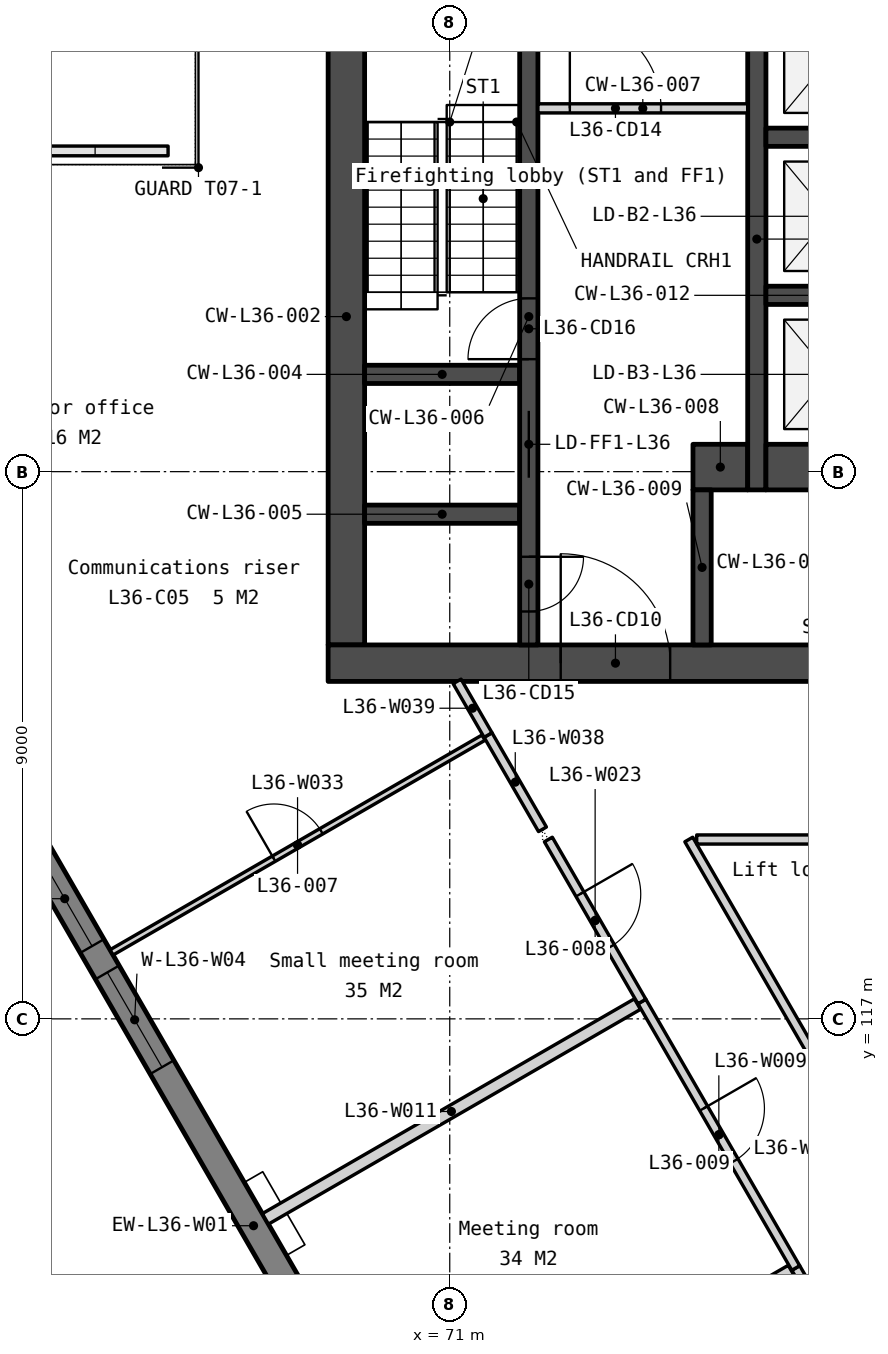
"""IFC4 building model, lengths in metres.
Left out: names, types, materials, properties, quantities, classifications, styles, units other than length and angle.
Written with IfcOpenShell. Run it as: python <this file> out.ifc"""

import sys

from ifc_helpers import new_model, si_unit, direction, frame, frame_2d, origin, place, context, subcontext, project, spatial, polyline, rectangle, outline, extrude, element, fill, save


model = new_model("IFC4")
c1 = context("Model", 3, precision=1e-05, world=origin(), true_north=direction((0.0, 1.0)))
c2 = subcontext(c1, "Body", "Model", "MODEL_VIEW")
j1 = project(units=[si_unit("LENGTHUNIT", "METRE"), si_unit("PLANEANGLEUNIT", "RADIAN")], contexts=[c1])
p1 = place(None, origin())
s1 = spatial("IfcSite", under=j1, at=p1, CompositionType="ELEMENT")
p2 = place(p1, origin())
s2 = spatial("IfcBuilding", under=s1, at=p2, CompositionType="ELEMENT")
p3 = place(p2, frame((0.0, 0.0, 144.2)))
s3 = spatial("IfcBuildingStorey", under=s2, at=p3, CompositionType="ELEMENT", Elevation=144.2)
p4 = place(p3, frame((69.3, 133.95, 0.0), z_axis=(0.0, 0.0, 1.0), x_axis=(0.0, -1.0, 0.0)))
e1 = element("IfcWall", 1, at=p4, inside=s3, PredefinedType="SOLIDWALL", context=c2, shape_type="SweptSolid", body=[
    extrude(rectangle(XDim=10.8, YDim=0.6, at=frame_2d((5.4, 0.0))), origin(), (0.0, 0.0, 1.0), 3.75),
])
p5 = place(p3, frame((69.0, 122.85, 0.0), z_axis=(0.0, 0.0, 1.0), x_axis=(1.0, 0.0, 0.0)))
e2 = element("IfcWall", 2, at=p5, inside=s3, PredefinedType="SOLIDWALL", context=c2, shape_type="SweptSolid", body=[
    extrude(rectangle(XDim=22.0, YDim=0.6, at=frame_2d((11.0, 0.0))), origin(), (0.0, 0.0, 1.0), 3.75),
])
p6 = place(p5, frame((16.375, 0.0, 0.0)))
e3 = element("IfcOpeningElement", 3, at=p6, cuts=e2, PredefinedType="OPENING", context=c2, shape_type="SweptSolid", body=[
    extrude(rectangle(XDim=1.8, YDim=2.1, at=frame_2d((0.9, 1.05))), frame((0.0, 0.31, 0.0), z_axis=(0.0, -1.0, 0.0), x_axis=(1.0, 0.0, 0.0)), (0.0, 0.0, 1.0), 0.62),
])
p7 = place(p5, frame((3.825, 0.0, 0.0)))
e4 = element("IfcOpeningElement", 4, at=p7, cuts=e2, PredefinedType="OPENING", context=c2, shape_type="SweptSolid", body=[
    extrude(rectangle(XDim=1.8, YDim=2.1, at=frame_2d((0.9, 1.05))), frame((0.0, 0.31, 0.0), z_axis=(0.0, -1.0, 0.0), x_axis=(1.0, 0.0, 0.0)), (0.0, 0.0, 1.0), 0.62),
])
p8 = place(p5, frame((12.85, 0.0, 0.0)))
e5 = element("IfcOpeningElement", 5, at=p8, cuts=e2, PredefinedType="OPENING", context=c2, shape_type="SweptSolid", body=[
    extrude(rectangle(XDim=1.5, YDim=2.1, at=frame_2d((0.75, 1.05))), frame((0.0, 0.31, 0.0), z_axis=(0.0, -1.0, 0.0), x_axis=(1.0, 0.0, 0.0)), (0.0, 0.0, 1.0), 0.62),
])
for number, where, z_axis, x_axis in (
    (6, (69.6, 127.6, 0.0), (0.0, 0.0, 1.0), (1.0, 0.0, 0.0)),
    (7, (69.6, 125.3, 0.0), (0.0, 0.0, 1.0), (1.0, 0.0, 0.0)),
):
    element("IfcWall", number, at=place(p3, frame(where, z_axis=z_axis, x_axis=x_axis)), inside=s3, PredefinedType="SOLIDWALL", context=c2, shape_type="SweptSolid", body=[
        extrude(rectangle(XDim=2.55, YDim=0.3, at=frame_2d((1.275, 0.0))), origin(), (0.0, 0.0, 1.0), 3.75),
    ])
p9 = place(p3, frame((72.3, 133.95, 0.0), z_axis=(0.0, 0.0, 1.0), x_axis=(0.0, -1.0, 0.0)))
e8 = element("IfcWall", 8, at=p9, inside=s3, PredefinedType="SOLIDWALL", context=c2, shape_type="SweptSolid", body=[
    extrude(rectangle(XDim=10.8, YDim=0.3, at=frame_2d((5.4, 0.0))), origin(), (0.0, 0.0, 1.0), 3.75),
])
p10 = place(p9, frame((6.95, 0.0, 0.0)))
e9 = element("IfcOpeningElement", 9, at=p10, cuts=e8, PredefinedType="OPENING", context=c2, shape_type="SweptSolid", body=[
    extrude(rectangle(XDim=1.1, YDim=2.1, at=frame_2d((0.55, 1.05))), frame((0.0, 0.16, 0.0), z_axis=(0.0, -1.0, 0.0), x_axis=(1.0, 0.0, 0.0)), (0.0, 0.0, 1.0), 0.32),
])
p11 = place(p9, frame((9.35, 0.0, 0.0)))
e10 = element("IfcOpeningElement", 10, at=p11, cuts=e8, PredefinedType="OPENING", context=c2, shape_type="SweptSolid", body=[
    extrude(rectangle(XDim=0.9, YDim=2.1, at=frame_2d((0.45, 1.05))), frame((0.0, 0.16, 0.0), z_axis=(0.0, -1.0, 0.0), x_axis=(1.0, 0.0, 0.0)), (0.0, 0.0, 1.0), 0.32),
])
p12 = place(p9, frame((5.1, 0.0, 0.0)))
e11 = element("IfcOpeningElement", 11, at=p12, cuts=e8, PredefinedType="OPENING", context=c2, shape_type="SweptSolid", body=[
    extrude(rectangle(XDim=1.0, YDim=2.1, at=frame_2d((0.5, 1.05))), frame((0.0, 0.16, 0.0), z_axis=(0.0, -1.0, 0.0), x_axis=(1.0, 0.0, 0.0)), (0.0, 0.0, 1.0), 0.32),
])
p13 = place(p3, frame((72.45, 131.975, 0.0), z_axis=(0.0, 0.0, 1.0), x_axis=(1.0, 0.0, 0.0)))
e12 = element("IfcWall", 12, at=p13, inside=s3, PredefinedType="PARTITIONING", context=c2, shape_type="SweptSolid", body=[
    extrude(rectangle(XDim=3.45, YDim=0.15, at=frame_2d((1.725, 0.0))), origin(), (0.0, 0.0, 1.0), 3.75),
])
p14 = place(p13, frame((0.525, 0.0, 0.0)))
e13 = element("IfcOpeningElement", 13, at=p14, cuts=e12, PredefinedType="OPENING", context=c2, shape_type="SweptSolid", body=[
    extrude(rectangle(XDim=1.5, YDim=2.1, at=frame_2d((0.75, 1.05))), frame((0.0, 0.085, 0.0), z_axis=(0.0, -1.0, 0.0), x_axis=(1.0, 0.0, 0.0)), (0.0, 0.0, 1.0), 0.17),
])
p15 = place(p3, frame((75.0, 126.075, 0.0), z_axis=(0.0, 0.0, 1.0), x_axis=(1.0, 0.0, 0.0)))
e14 = element("IfcWall", 14, at=p15, inside=s3, PredefinedType="SOLIDWALL", context=c2, shape_type="SweptSolid", body=[
    extrude(rectangle(XDim=0.9, YDim=0.75, at=frame_2d((0.45, 0.0))), origin(), (0.0, 0.0, 1.0), 3.75),
])
p16 = place(p3, frame((75.15, 125.7, 0.0), z_axis=(0.0, 0.0, 1.0), x_axis=(0.0, -1.0, 0.0)))
e15 = element("IfcWall", 15, at=p16, inside=s3, PredefinedType="SOLIDWALL", context=c2, shape_type="SweptSolid", body=[
    extrude(rectangle(XDim=2.55, YDim=0.3, at=frame_2d((1.275, 0.0))), origin(), (0.0, 0.0, 1.0), 3.75),
])
p17 = place(p3, frame((76.05, 133.95, 0.0), z_axis=(0.0, 0.0, 1.0), x_axis=(0.0, -1.0, 0.0)))
e16 = element("IfcWall", 16, at=p17, inside=s3, PredefinedType="SOLIDWALL", context=c2, shape_type="SweptSolid", body=[
    extrude(rectangle(XDim=8.25, YDim=0.3, at=frame_2d((4.125, 0.0))), origin(), (0.0, 0.0, 1.0), 3.75),
])
for number, where, z_axis, x_axis in (
    (17, (76.2, 131.5, 0.0), (0.0, 0.0, 1.0), (1.0, 0.0, 0.0)),
    (18, (76.2, 128.9, 0.0), (0.0, 0.0, 1.0), (1.0, 0.0, 0.0)),
):
    element("IfcWall", number, at=place(p3, frame(where, z_axis=z_axis, x_axis=x_axis)), inside=s3, PredefinedType="SOLIDWALL", context=c2, shape_type="SweptSolid", body=[
        extrude(rectangle(XDim=2.1, YDim=0.3, at=frame_2d((1.05, 0.0))), origin(), (0.0, 0.0, 1.0), 3.75),
    ])
p18 = place(p3, frame((76.2, 126.075, 0.0), z_axis=(0.0, 0.0, 1.0), x_axis=(1.0, 0.0, 0.0)))
e19 = element("IfcWall", 19, at=p18, inside=s3, PredefinedType="SOLIDWALL", context=c2, shape_type="SweptSolid", body=[
    extrude(rectangle(XDim=2.1, YDim=0.75, at=frame_2d((1.05, 0.0))), origin(), (0.0, 0.0, 1.0), 3.75),
])
p19 = place(p3, frame((57.652, 131.129, -0.15), z_axis=(0.0, 0.0, 1.0), x_axis=(0.499997369791, -0.866026922331, 0.0)))
e20 = element("IfcWall", 20, at=p19, inside=s3, PredefinedType="SOLIDWALL", context=c2, shape_type="SweptSolid", body=[
    extrude(outline(polyline([(40.486, 0.0), (40.486, 3.9), (0.0, 3.9), (0.0, 0.0), (40.486, 0.0)])), frame((0.0, 0.225, 0.0), z_axis=(0.0, -1.0, 0.0), x_axis=(1.0, 0.0, 0.0)), (0.0, 0.0, 1.0), 0.45),
])
p20 = place(p19, frame((3.011, 0.0, 0.95)))
e21 = element("IfcOpeningElement", 21, at=p20, cuts=e20, PredefinedType="OPENING", context=c2, shape_type="SweptSolid", body=[
    extrude(rectangle(XDim=1.8, YDim=2.2, at=frame_2d((0.9, 1.1))), frame((0.0, 0.235, 0.0), z_axis=(0.0, -1.0, 0.0), x_axis=(1.0, 0.0, 0.0)), (0.0, 0.0, 1.0), 0.47),
])
p21 = place(p19, frame((5.311, 0.0, 0.95)))
e22 = element("IfcOpeningElement", 22, at=p21, cuts=e20, PredefinedType="OPENING", context=c2, shape_type="SweptSolid", body=[
    extrude(rectangle(XDim=1.8, YDim=2.2, at=frame_2d((0.9, 1.1))), frame((0.0, 0.235, 0.0), z_axis=(0.0, -1.0, 0.0), x_axis=(1.0, 0.0, 0.0)), (0.0, 0.0, 1.0), 0.47),
])
p22 = place(p19, frame((13.132, 0.0, 0.95)))
e23 = element("IfcOpeningElement", 23, at=p22, cuts=e20, PredefinedType="OPENING", context=c2, shape_type="SweptSolid", body=[
    extrude(rectangle(XDim=1.8, YDim=2.2, at=frame_2d((0.9, 1.1))), frame((0.0, 0.235, 0.0), z_axis=(0.0, -1.0, 0.0), x_axis=(1.0, 0.0, 0.0)), (0.0, 0.0, 1.0), 0.47),
])
p23 = place(p19, frame((15.432, 0.0, 0.95)))
e24 = element("IfcOpeningElement", 24, at=p23, cuts=e20, PredefinedType="OPENING", context=c2, shape_type="SweptSolid", body=[
    extrude(rectangle(XDim=1.8, YDim=2.2, at=frame_2d((0.9, 1.1))), frame((0.0, 0.235, 0.0), z_axis=(0.0, -1.0, 0.0), x_axis=(1.0, 0.0, 0.0)), (0.0, 0.0, 1.0), 0.47),
])
p24 = place(p19, frame((23.254, 0.0, 0.95)))
e25 = element("IfcOpeningElement", 25, at=p24, cuts=e20, PredefinedType="OPENING", context=c2, shape_type="SweptSolid", body=[
    extrude(rectangle(XDim=1.8, YDim=2.2, at=frame_2d((0.9, 1.1))), frame((0.0, 0.235, 0.0), z_axis=(0.0, -1.0, 0.0), x_axis=(1.0, 0.0, 0.0)), (0.0, 0.0, 1.0), 0.47),
])
p25 = place(p19, frame((25.554, 0.0, 0.95)))
e26 = element("IfcOpeningElement", 26, at=p25, cuts=e20, PredefinedType="OPENING", context=c2, shape_type="SweptSolid", body=[
    extrude(rectangle(XDim=1.8, YDim=2.2, at=frame_2d((0.9, 1.1))), frame((0.0, 0.235, 0.0), z_axis=(0.0, -1.0, 0.0), x_axis=(1.0, 0.0, 0.0)), (0.0, 0.0, 1.0), 0.47),
])
p26 = place(p19, frame((33.375, 0.0, 0.95)))
e27 = element("IfcOpeningElement", 27, at=p26, cuts=e20, PredefinedType="OPENING", context=c2, shape_type="SweptSolid", body=[
    extrude(rectangle(XDim=1.8, YDim=2.2, at=frame_2d((0.9, 1.1))), frame((0.0, 0.235, 0.0), z_axis=(0.0, -1.0, 0.0), x_axis=(1.0, 0.0, 0.0)), (0.0, 0.0, 1.0), 0.47),
])
p27 = place(p19, frame((35.675, 0.0, 0.95)))
e28 = element("IfcOpeningElement", 28, at=p27, cuts=e20, PredefinedType="OPENING", context=c2, shape_type="SweptSolid", body=[
    extrude(rectangle(XDim=1.8, YDim=2.2, at=frame_2d((0.9, 1.1))), frame((0.0, 0.235, 0.0), z_axis=(0.0, -1.0, 0.0), x_axis=(1.0, 0.0, 0.0)), (0.0, 0.0, 1.0), 0.47),
])
p28 = place(p3, frame((76.691, 112.903, 0.0), z_axis=(0.0, 0.0, 1.0), x_axis=(0.501707830428, -0.8650371396, 0.0)))
e29 = element("IfcWall", 29, at=p28, inside=s3, PredefinedType="PARTITIONING", context=c2, shape_type="SweptSolid", body=[
    extrude(rectangle(XDim=4.986, YDim=0.15, at=frame_2d((2.493, 0.0))), origin(), (0.0, 0.0, 1.0), 3.75),
])
p29 = place(p28, frame((1.993, 0.0, 0.0)))
e30 = element("IfcOpeningElement", 30, at=p29, cuts=e29, PredefinedType="OPENING", context=c2, shape_type="SweptSolid", body=[
    extrude(rectangle(XDim=1.0, YDim=2.1, at=frame_2d((0.5, 1.05))), frame((0.0, 0.085, 0.0), z_axis=(0.0, -1.0, 0.0), x_axis=(1.0, 0.0, 0.0)), (0.0, 0.0, 1.0), 0.17),
])
p30 = place(p3, frame((70.499, 109.327, 0.0), z_axis=(0.0, 0.0, 1.0), x_axis=(0.866010067511, 0.500026562264, 0.0)))
e31 = element("IfcWall", 31, at=p30, inside=s3, PredefinedType="PARTITIONING", context=c2, shape_type="SweptSolid", body=[
    extrude(rectangle(XDim=7.065, YDim=0.2, at=frame_2d((3.532, 0.0))), origin(), (0.0, 0.0, 1.0), 3.75),
])
p31 = place(p3, frame((74.931, 119.95, 0.0), z_axis=(0.0, 0.0, 1.0), x_axis=(0.499998319705, -0.866026373901, 0.0)))
e32 = element("IfcWall", 32, at=p31, inside=s3, PredefinedType="PARTITIONING", context=c2, shape_type="SweptSolid", body=[
    extrude(rectangle(XDim=10.138, YDim=0.15, at=frame_2d((5.069, 0.0))), origin(), (0.0, 0.0, 1.0), 3.75),
])
p32 = place(p31, frame((4.169, 0.0, 0.0)))
e33 = element("IfcOpeningElement", 33, at=p32, cuts=e32, PredefinedType="OPENING", context=c2, shape_type="SweptSolid", body=[
    extrude(rectangle(XDim=1.8, YDim=2.1, at=frame_2d((0.9, 1.05))), frame((0.0, 0.085, 0.0), z_axis=(0.0, -1.0, 0.0), x_axis=(1.0, 0.0, 0.0)), (0.0, 0.0, 1.0), 0.17),
])
p33 = place(p3, frame((74.16, 117.285, 0.0), z_axis=(0.0, 0.0, 1.0), x_axis=(0.500035650373, -0.866004820053, 0.0)))
e34 = element("IfcWall", 34, at=p33, inside=s3, PredefinedType="PARTITIONING", context=c2, shape_type="SweptSolid", body=[
    extrude(rectangle(XDim=5.061, YDim=0.15, at=frame_2d((2.53, 0.0))), origin(), (0.0, 0.0, 1.0), 3.75),
])
p34 = place(p33, frame((2.03, 0.0, 0.0)))
e35 = element("IfcOpeningElement", 35, at=p34, cuts=e34, PredefinedType="OPENING", context=c2, shape_type="SweptSolid", body=[
    extrude(rectangle(XDim=1.0, YDim=2.1, at=frame_2d((0.5, 1.05))), frame((0.0, 0.085, 0.0), z_axis=(0.0, -1.0, 0.0), x_axis=(1.0, 0.0, 0.0)), (0.0, 0.0, 1.0), 0.17),
])
p35 = place(p3, frame((67.968, 113.71, 0.0), z_axis=(0.0, 0.0, 1.0), x_axis=(0.866025031136, 0.500000645445, 0.0)))
e36 = element("IfcWall", 36, at=p35, inside=s3, PredefinedType="PARTITIONING", context=c2, shape_type="SweptSolid", body=[
    extrude(rectangle(XDim=7.065, YDim=0.2, at=frame_2d((3.532, 0.0))), origin(), (0.0, 0.0, 1.0), 3.75),
])
p36 = place(p3, frame((72.622, 119.95, 0.0), z_axis=(0.0, 0.0, 1.0), x_axis=(0.4999536902, -0.866052139109, 0.0)))
e37 = element("IfcWall", 37, at=p36, inside=s3, PredefinedType="PARTITIONING", context=c2, shape_type="SweptSolid", body=[
    extrude(rectangle(XDim=3.077, YDim=0.15, at=frame_2d((1.539, 0.0))), origin(), (0.0, 0.0, 1.0), 3.75),
])
p37 = place(p36, frame((1.039, 0.0, 0.0)))
e38 = element("IfcOpeningElement", 38, at=p37, cuts=e37, PredefinedType="OPENING", context=c2, shape_type="SweptSolid", body=[
    extrude(rectangle(XDim=1.0, YDim=2.1, at=frame_2d((0.5, 1.05))), frame((0.0, 0.085, 0.0), z_axis=(0.0, -1.0, 0.0), x_axis=(1.0, 0.0, 0.0)), (0.0, 0.0, 1.0), 0.17),
])
p38 = place(p3, frame((65.438, 118.093, 0.0), z_axis=(0.0, 0.0, 1.0), x_axis=(0.866025031136, 0.500000645445, 0.0)))
e39 = element("IfcWall", 39, at=p38, inside=s3, PredefinedType="PARTITIONING", context=c2, shape_type="SweptSolid", body=[
    extrude(rectangle(XDim=7.065, YDim=0.1, at=frame_2d((3.532, 0.0))), origin(), (0.0, 0.0, 1.0), 3.75),
])
p39 = place(p38, frame((3.083, 0.0, 0.0)))
e40 = element("IfcOpeningElement", 40, at=p39, cuts=e39, PredefinedType="OPENING", context=c2, shape_type="SweptSolid", body=[
    extrude(rectangle(XDim=0.9, YDim=2.1, at=frame_2d((0.45, 1.05))), frame((0.0, 0.06, 0.0), z_axis=(0.0, -1.0, 0.0), x_axis=(1.0, 0.0, 0.0)), (0.0, 0.0, 1.0), 0.12),
])
p40 = place(p3, frame((75.061, 119.95, 0.0), z_axis=(0.0, 0.0, 1.0), x_axis=(1.0, 0.0, 0.0)))
e41 = element("IfcWall", 41, at=p40, inside=s3, PredefinedType="PARTITIONING", context=c2, shape_type="SweptSolid", body=[
    extrude(rectangle(XDim=6.139, YDim=0.15, at=frame_2d((3.069, 0.0))), origin(), (0.0, 0.0, 1.0), 3.75),
])
p41 = place(p3, frame((71.63, 121.668, 0.0), z_axis=(0.0, 0.0, 1.0), x_axis=(0.499982180423, -0.866035691677, 0.0)))
e42 = element("IfcWall", 42, at=p41, inside=s3, PredefinedType="PARTITIONING", context=c2, shape_type="SweptSolid", body=[
    extrude(rectangle(XDim=1.79, YDim=0.15, at=frame_2d((0.895, 0.0))), origin(), (0.0, 0.0, 1.0), 3.75),
])
p42 = place(p3, frame((71.121, 122.55, 0.0), z_axis=(0.0, 0.0, 1.0), x_axis=(0.500006018292, -0.866021929094, 0.0)))
e43 = element("IfcWall", 43, at=p42, inside=s3, PredefinedType="PARTITIONING", context=c2, shape_type="SweptSolid", body=[
    extrude(rectangle(XDim=1.019, YDim=0.15, at=frame_2d((0.509, 0.0))), origin(), (0.0, 0.0, 1.0), 3.75),
])
p43 = place(p10, origin())
e44 = element("IfcDoor", 44, at=p43, inside=s3, OperationType="SLIDING_TO_LEFT", PredefinedType="DOOR", context=c2, shape_type="SweptSolid", body=[
    extrude(rectangle(XDim=1.1, YDim=2.1, at=frame_2d((0.55, 1.05))), frame((0.0, 0.025, 0.0), z_axis=(0.0, -1.0, 0.0), x_axis=(1.0, 0.0, 0.0)), (0.0, 0.0, 1.0), 0.05),
])
fill(e9, e44)
p44 = place(p7, origin())
e45 = element("IfcDoor", 45, at=p44, inside=s3, OperationType="DOUBLE_DOOR_DOUBLE_SWING", PredefinedType="DOOR", context=c2, shape_type="SweptSolid", body=[
    extrude(rectangle(XDim=1.8, YDim=2.1, at=frame_2d((0.9, 1.05))), frame((0.0, 0.025, 0.0), z_axis=(0.0, -1.0, 0.0), x_axis=(1.0, 0.0, 0.0)), (0.0, 0.0, 1.0), 0.05),
])
fill(e4, e45)
p45 = place(p14, origin())
e46 = element("IfcDoor", 46, at=p45, inside=s3, OperationType="DOUBLE_DOOR_DOUBLE_SWING", PredefinedType="DOOR", context=c2, shape_type="SweptSolid", body=[
    extrude(rectangle(XDim=1.5, YDim=2.1, at=frame_2d((0.75, 1.05))), frame((0.0, 0.025, 0.0), z_axis=(0.0, -1.0, 0.0), x_axis=(1.0, 0.0, 0.0)), (0.0, 0.0, 1.0), 0.05),
])
fill(e13, e46)
p46 = place(p11, origin())
e47 = element("IfcDoor", 47, at=p46, inside=s3, OperationType="SINGLE_SWING_LEFT", PredefinedType="DOOR", context=c2, shape_type="SweptSolid", body=[
    extrude(rectangle(XDim=0.9, YDim=2.1, at=frame_2d((0.45, 1.05))), frame((0.0, 0.025, 0.0), z_axis=(0.0, -1.0, 0.0), x_axis=(1.0, 0.0, 0.0)), (0.0, 0.0, 1.0), 0.05),
])
fill(e10, e47)
p47 = place(p12, origin())
e48 = element("IfcDoor", 48, at=p47, inside=s3, OperationType="SINGLE_SWING_RIGHT", PredefinedType="DOOR", context=c2, shape_type="SweptSolid", body=[
    extrude(rectangle(XDim=1.0, YDim=2.1, at=frame_2d((0.5, 1.05))), frame((0.0, 0.025, 0.0), z_axis=(0.0, -1.0, 0.0), x_axis=(1.0, 0.0, 0.0)), (0.0, 0.0, 1.0), 0.05),
])
fill(e11, e48)
p48 = place(p22, origin())
e49 = element("IfcWindow", 49, at=p48, inside=s3, PartitioningType="SINGLE_PANEL", PredefinedType="WINDOW", context=c2, shape_type="SweptSolid", body=[
    extrude(rectangle(XDim=1.8, YDim=2.2, at=frame_2d((0.9, 1.1))), frame((0.0, 0.03, 0.0), z_axis=(0.0, -1.0, 0.0), x_axis=(1.0, 0.0, 0.0)), (0.0, 0.0, 1.0), 0.06),
])
fill(e23, e49)
p49 = place(p23, origin())
e50 = element("IfcWindow", 50, at=p49, inside=s3, PartitioningType="SINGLE_PANEL", PredefinedType="WINDOW", context=c2, shape_type="SweptSolid", body=[
    extrude(rectangle(XDim=1.8, YDim=2.2, at=frame_2d((0.9, 1.1))), frame((0.0, 0.03, 0.0), z_axis=(0.0, -1.0, 0.0), x_axis=(1.0, 0.0, 0.0)), (0.0, 0.0, 1.0), 0.06),
])
fill(e24, e50)
p50 = place(p39, origin())
e51 = element("IfcDoor", 51, at=p50, inside=s3, OperationType="SINGLE_SWING_LEFT", PredefinedType="DOOR", context=c2, shape_type="SweptSolid", body=[
    extrude(rectangle(XDim=0.9, YDim=2.1, at=frame_2d((0.45, 1.05))), frame((0.0, 0.025, 0.0), z_axis=(0.0, -1.0, 0.0), x_axis=(1.0, 0.0, 0.0)), (0.0, 0.0, 1.0), 0.05),
])
fill(e40, e51)
p51 = place(p37, origin())
e52 = element("IfcDoor", 52, at=p51, inside=s3, OperationType="SINGLE_SWING_LEFT", PredefinedType="DOOR", context=c2, shape_type="SweptSolid", body=[
    extrude(rectangle(XDim=1.0, YDim=2.1, at=frame_2d((0.5, 1.05))), frame((0.0, 0.025, 0.0), z_axis=(0.0, -1.0, 0.0), x_axis=(1.0, 0.0, 0.0)), (0.0, 0.0, 1.0), 0.05),
])
fill(e38, e52)
p52 = place(p34, origin())
e53 = element("IfcDoor", 53, at=p52, inside=s3, OperationType="SINGLE_SWING_LEFT", PredefinedType="DOOR", context=c2, shape_type="SweptSolid", body=[
    extrude(rectangle(XDim=1.0, YDim=2.1, at=frame_2d((0.5, 1.05))), frame((0.0, 0.025, 0.0), z_axis=(0.0, -1.0, 0.0), x_axis=(1.0, 0.0, 0.0)), (0.0, 0.0, 1.0), 0.05),
])
fill(e35, e53)
save(model, sys.argv[1])
